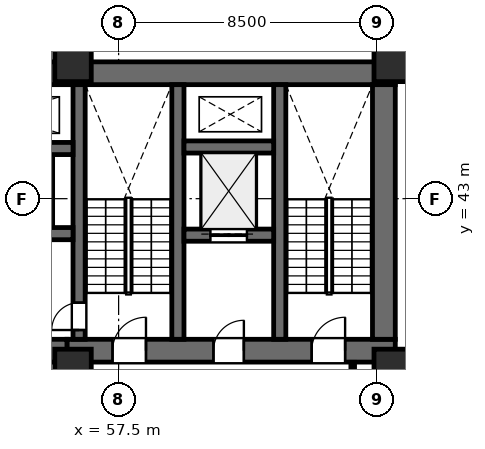
"""IFC4 building model, lengths in metres.
Left out: names, types, materials, properties, quantities, classifications, styles, units other than length and angle.
Written with IfcOpenShell. Run it as: python <this file> out.ifc"""

import sys

from ifc_helpers import new_model, si_unit, direction, frame, frame_2d, origin, origin_2d, place, context, subcontext, project, spatial, rectangle, extrude, element, fill, save


model = new_model("IFC4")
c1 = context("Model", 3, precision=1e-05, world=origin(), true_north=direction((0.0, 1.0)))
c2 = subcontext(c1, "Body", "Model", "MODEL_VIEW")
j1 = project(units=[si_unit("LENGTHUNIT", "METRE"), si_unit("PLANEANGLEUNIT", "RADIAN")], contexts=[c1])
p1 = place(None, origin())
s1 = spatial("IfcSite", under=j1, at=p1, CompositionType="ELEMENT")
p2 = place(p1, origin())
s2 = spatial("IfcBuilding", under=s1, at=p2, CompositionType="ELEMENT")
p3 = place(p2, frame((0.0, 0.0, 37.5)))
s3 = spatial("IfcBuildingStorey", under=s2, at=p3, CompositionType="ELEMENT", Elevation=37.5)
p4 = place(p3, frame((22.9, 47.125, 0.0), z_axis=(0.0, 0.0, 1.0), x_axis=(1.0, 0.0, 0.0)))
e1 = element("IfcWall", 1, at=p4, inside=s3, PredefinedType="SHEAR", context=c2, shape_type="SweptSolid", body=[
    extrude(rectangle(XDim=43.7, YDim=0.75, at=frame_2d((21.85, 0.0))), origin(), (0.0, 0.0, 1.0), 4.0),
])
p5 = place(p3, frame((55.8, 38.0, 0.0), z_axis=(0.0, 0.0, 1.0), x_axis=(1.0, 0.0, 0.0)))
e2 = element("IfcWall", 2, at=p5, inside=s3, PredefinedType="SHEAR", context=c2, shape_type="SweptSolid", body=[
    extrude(rectangle(XDim=10.8, YDim=0.75, at=frame_2d((5.4, 0.0))), origin(), (0.0, 0.0, 1.0), 4.0),
])
p6 = place(p5, frame((1.5, 0.0, 0.0)))
e3 = element("IfcOpeningElement", 3, at=p6, cuts=e2, PredefinedType="OPENING", context=c2, shape_type="SweptSolid", body=[
    extrude(rectangle(XDim=1.1, YDim=2.2, at=frame_2d((0.55, 1.1))), frame((0.0, 0.385, 0.0), z_axis=(0.0, -1.0, 0.0), x_axis=(1.0, 0.0, 0.0)), (0.0, 0.0, 1.0), 0.77),
])
p7 = place(p5, frame((4.82, 0.0, 0.0)))
e4 = element("IfcOpeningElement", 4, at=p7, cuts=e2, PredefinedType="OPENING", context=c2, shape_type="SweptSolid", body=[
    extrude(rectangle(XDim=1.0, YDim=2.15, at=frame_2d((0.5, 1.075))), frame((0.0, 0.385, 0.0), z_axis=(0.0, -1.0, 0.0), x_axis=(1.0, 0.0, 0.0)), (0.0, 0.0, 1.0), 0.77),
])
p8 = place(p5, frame((8.05, 0.0, 0.0)))
e5 = element("IfcOpeningElement", 5, at=p8, cuts=e2, PredefinedType="OPENING", context=c2, shape_type="SweptSolid", body=[
    extrude(rectangle(XDim=1.1, YDim=2.2, at=frame_2d((0.55, 1.1))), frame((0.0, 0.385, 0.0), z_axis=(0.0, -1.0, 0.0), x_axis=(1.0, 0.0, 0.0)), (0.0, 0.0, 1.0), 0.77),
])
p9 = place(p3, frame((66.225, 38.375, 0.0), z_axis=(0.0, 0.0, 1.0), x_axis=(0.0, 1.0, 0.0)))
e6 = element("IfcWall", 6, at=p9, inside=s3, PredefinedType="SHEAR", context=c2, shape_type="SweptSolid", body=[
    extrude(rectangle(XDim=8.375, YDim=0.75, at=frame_2d((4.188, 0.0))), origin(), (0.0, 0.0, 1.0), 4.0),
])
for number, where, z_axis, x_axis in (
    (7, (62.8, 38.375, 0.0), (0.0, 0.0, 1.0), (0.0, 1.0, 0.0)),
    (8, (59.45, 38.375, 0.0), (0.0, 0.0, 1.0), (0.0, 1.0, 0.0)),
):
    element("IfcWall", number, at=place(p3, frame(where, z_axis=z_axis, x_axis=x_axis)), inside=s3, PredefinedType="SHEAR", context=c2, shape_type="SweptSolid", body=[
        extrude(rectangle(XDim=8.375, YDim=0.4, at=frame_2d((4.188, 0.0))), origin(), (0.0, 0.0, 1.0), 4.0),
    ])
p10 = place(p3, frame((56.2, 38.375, 0.0), z_axis=(0.0, 0.0, 1.0), x_axis=(0.0, 1.0, 0.0)))
e9 = element("IfcWall", 9, at=p10, inside=s3, PredefinedType="SHEAR", context=c2, shape_type="SweptSolid", body=[
    extrude(rectangle(XDim=8.375, YDim=0.4, at=frame_2d((4.188, 0.0))), origin(), (0.0, 0.0, 1.0), 4.0),
])
p11 = place(p10, frame((0.305, 0.0, 0.0)))
e10 = element("IfcOpeningElement", 10, at=p11, cuts=e9, PredefinedType="OPENING", context=c2, shape_type="SweptSolid", body=[
    extrude(rectangle(XDim=0.9, YDim=2.15, at=frame_2d((0.45, 1.075))), frame((0.0, 0.21, 0.0), z_axis=(0.0, -1.0, 0.0), x_axis=(1.0, 0.0, 0.0)), (0.0, 0.0, 1.0), 0.42),
])
p12 = place(p3, frame((59.65, 41.8, 0.0), z_axis=(0.0, 0.0, 1.0), x_axis=(1.0, 0.0, 0.0)))
e11 = element("IfcWall", 11, at=p12, inside=s3, PredefinedType="SHEAR", context=c2, shape_type="SweptSolid", body=[
    extrude(rectangle(XDim=2.95, YDim=0.4, at=frame_2d((1.475, 0.0))), origin(), (0.0, 0.0, 1.0), 4.0),
])
p13 = place(p12, frame((0.87, 0.0, 0.0)))
e12 = element("IfcOpeningElement", 12, at=p13, cuts=e11, PredefinedType="OPENING", context=c2, shape_type="SweptSolid", body=[
    extrude(rectangle(XDim=1.2, YDim=2.2, at=frame_2d((0.6, 1.1))), frame((0.0, 0.21, 0.0), z_axis=(0.0, -1.0, 0.0), x_axis=(1.0, 0.0, 0.0)), (0.0, 0.0, 1.0), 0.42),
])
p14 = place(p3, frame((59.65, 44.7, 0.0), z_axis=(0.0, 0.0, 1.0), x_axis=(1.0, 0.0, 0.0)))
e13 = element("IfcWall", 13, at=p14, inside=s3, PredefinedType="SHEAR", context=c2, shape_type="SweptSolid", body=[
    extrude(rectangle(XDim=2.95, YDim=0.4, at=frame_2d((1.475, 0.0))), origin(), (0.0, 0.0, 1.0), 4.0),
])
p15 = place(p3, frame((50.8, 38.0, 0.0), z_axis=(0.0, 0.0, 1.0), x_axis=(1.0, 0.0, 0.0)))
e14 = element("IfcWall", 14, at=p15, inside=s3, PredefinedType="SHEAR", context=c2, shape_type="SweptSolid", body=[
    extrude(rectangle(XDim=5.0, YDim=0.75, at=frame_2d((2.5, 0.0))), origin(), (0.0, 0.0, 1.0), 4.0),
])
p16 = place(p15, frame((2.0, 0.0, 0.0)))
e15 = element("IfcOpeningElement", 15, at=p16, cuts=e14, PredefinedType="OPENING", context=c2, shape_type="SweptSolid", body=[
    extrude(rectangle(XDim=1.2, YDim=2.2, at=frame_2d((0.6, 1.1))), frame((0.0, 0.385, 0.0), z_axis=(0.0, -1.0, 0.0), x_axis=(1.0, 0.0, 0.0)), (0.0, 0.0, 1.0), 0.77),
])
p17 = place(p3, frame((51.25, 41.85, 0.0), z_axis=(0.0, 0.0, 1.0), x_axis=(1.0, 0.0, 0.0)))
e16 = element("IfcWall", 16, at=p17, inside=s3, PredefinedType="SHEAR", context=c2, shape_type="SweptSolid", body=[
    extrude(rectangle(XDim=4.75, YDim=0.4, at=frame_2d((2.375, 0.0))), origin(), (0.0, 0.0, 1.0), 4.0),
])
p18 = place(p17, frame((0.5, 0.0, 0.0)))
e17 = element("IfcOpeningElement", 17, at=p18, cuts=e16, PredefinedType="OPENING", context=c2, shape_type="SweptSolid", body=[
    extrude(rectangle(XDim=1.2, YDim=2.2, at=frame_2d((0.6, 1.1))), frame((0.0, 0.21, 0.0), z_axis=(0.0, -1.0, 0.0), x_axis=(1.0, 0.0, 0.0)), (0.0, 0.0, 1.0), 0.42),
])
p19 = place(p17, frame((2.6, 0.0, 0.0)))
e18 = element("IfcOpeningElement", 18, at=p19, cuts=e16, PredefinedType="OPENING", context=c2, shape_type="SweptSolid", body=[
    extrude(rectangle(XDim=1.2, YDim=2.2, at=frame_2d((0.6, 1.1))), frame((0.0, 0.21, 0.0), z_axis=(0.0, -1.0, 0.0), x_axis=(1.0, 0.0, 0.0)), (0.0, 0.0, 1.0), 0.42),
])
p20 = place(p3, frame((51.25, 44.65, 0.0), z_axis=(0.0, 0.0, 1.0), x_axis=(1.0, 0.0, 0.0)))
e19 = element("IfcWall", 19, at=p20, inside=s3, PredefinedType="SHEAR", context=c2, shape_type="SweptSolid", body=[
    extrude(rectangle(XDim=4.75, YDim=0.4, at=frame_2d((2.375, 0.0))), origin(), (0.0, 0.0, 1.0), 4.0),
])
for number, where, z_axis, x_axis in (
    (20, (66.5, 47.55, 0.0), (0.0, 0.0, 1.0), (1.0, 0.0, 0.0)),
    (21, (56.0, 47.55, 0.0), (0.0, 0.0, 1.0), (1.0, 0.0, 0.0)),
    (22, (66.5, 37.35, 0.0), (0.0, 0.0, 1.0), (1.0, 0.0, 0.0)),
    (23, (56.0, 37.35, 0.0), (0.0, 0.0, 1.0), (1.0, 0.0, 0.0)),
):
    element("IfcColumn", number, at=place(p3, frame(where, z_axis=z_axis, x_axis=x_axis)), inside=s3, PredefinedType="COLUMN", context=c2, shape_type="SweptSolid", body=[
        extrude(rectangle(XDim=1.2, YDim=1.4, at=origin_2d()), origin(), (0.0, 0.0, 1.0), 4.0),
    ])
p21 = place(p3, frame((68.375, 37.8, 0.0), z_axis=(0.0, 0.0, 1.0), x_axis=(-0.139174610616, -0.990267856572, 0.0)))
e24 = element("IfcWall", 24, at=p21, inside=s3, PredefinedType="STANDARD", context=c2, shape_type="SweptSolid", body=[
    extrude(rectangle(XDim=34.6, YDim=0.28, at=frame_2d((17.3, 0.0))), origin(), (0.0, 0.0, 1.0), 3.74),
])
p22 = place(p21, frame((8.44, 0.0, 0.0)))
e25 = element("IfcOpeningElement", 25, at=p22, cuts=e24, PredefinedType="OPENING", context=c2, shape_type="SweptSolid", body=[
    extrude(rectangle(XDim=1.0, YDim=2.15, at=frame_2d((0.5, 1.075))), frame((0.0, 0.15, 0.0), z_axis=(0.0, -1.0, 0.0), x_axis=(1.0, 0.0, 0.0)), (0.0, 0.0, 1.0), 0.3),
])
p23 = place(p21, frame((4.092, 0.0, 0.65)))
e26 = element("IfcOpeningElement", 26, at=p23, cuts=e24, PredefinedType="OPENING", context=c2, shape_type="SweptSolid", body=[
    extrude(rectangle(XDim=1.8, YDim=2.1, at=frame_2d((0.9, 1.05))), frame((0.0, 0.15, 0.0), z_axis=(0.0, -1.0, 0.0), x_axis=(1.0, 0.0, 0.0)), (0.0, 0.0, 1.0), 0.3),
])
p24 = place(p21, frame((20.903, 0.0, 0.65)))
e27 = element("IfcOpeningElement", 27, at=p24, cuts=e24, PredefinedType="OPENING", context=c2, shape_type="SweptSolid", body=[
    extrude(rectangle(XDim=1.8, YDim=2.1, at=frame_2d((0.9, 1.05))), frame((0.0, 0.15, 0.0), z_axis=(0.0, -1.0, 0.0), x_axis=(1.0, 0.0, 0.0)), (0.0, 0.0, 1.0), 0.3),
])
p25 = place(p3, frame((65.2, 34.4, 0.0), z_axis=(0.0, 0.0, 1.0), x_axis=(0.0, 1.0, 0.0)))
e28 = element("IfcWall", 28, at=p25, inside=s3, PredefinedType="PARTITIONING", context=c2, shape_type="SweptSolid", body=[
    extrude(rectangle(XDim=3.217, YDim=0.12, at=frame_2d((1.608, 0.0))), origin(), (0.0, 0.0, 1.0), 2.813),
])
p26 = place(p6, origin())
e29 = element("IfcDoor", 29, at=p26, inside=s3, OperationType="SINGLE_SWING_RIGHT", PredefinedType="DOOR", context=c2, shape_type="SweptSolid", body=[
    extrude(rectangle(XDim=1.1, YDim=2.2, at=frame_2d((0.55, 1.1))), frame((0.0, 0.025, 0.0), z_axis=(0.0, -1.0, 0.0), x_axis=(1.0, 0.0, 0.0)), (0.0, 0.0, 1.0), 0.05),
])
fill(e3, e29)
p27 = place(p7, origin())
e30 = element("IfcDoor", 30, at=p27, inside=s3, OperationType="SINGLE_SWING_RIGHT", PredefinedType="DOOR", context=c2, shape_type="SweptSolid", body=[
    extrude(rectangle(XDim=1.0, YDim=2.15, at=frame_2d((0.5, 1.075))), frame((0.0, 0.025, 0.0), z_axis=(0.0, -1.0, 0.0), x_axis=(1.0, 0.0, 0.0)), (0.0, 0.0, 1.0), 0.05),
])
fill(e4, e30)
p28 = place(p8, origin())
e31 = element("IfcDoor", 31, at=p28, inside=s3, OperationType="SINGLE_SWING_RIGHT", PredefinedType="DOOR", context=c2, shape_type="SweptSolid", body=[
    extrude(rectangle(XDim=1.1, YDim=2.2, at=frame_2d((0.55, 1.1))), frame((0.0, 0.025, 0.0), z_axis=(0.0, -1.0, 0.0), x_axis=(1.0, 0.0, 0.0)), (0.0, 0.0, 1.0), 0.05),
])
fill(e5, e31)
p29 = place(p11, origin())
e32 = element("IfcDoor", 32, at=p29, inside=s3, OperationType="SINGLE_SWING_LEFT", PredefinedType="DOOR", context=c2, shape_type="SweptSolid", body=[
    extrude(rectangle(XDim=0.9, YDim=2.15, at=frame_2d((0.45, 1.075))), frame((0.0, 0.025, 0.0), z_axis=(0.0, -1.0, 0.0), x_axis=(1.0, 0.0, 0.0)), (0.0, 0.0, 1.0), 0.05),
])
fill(e10, e32)
p30 = place(p13, origin())
e33 = element("IfcDoor", 33, at=p30, inside=s3, OperationType="DOUBLE_DOOR_SLIDING", PredefinedType="DOOR", context=c2, shape_type="SweptSolid", body=[
    extrude(rectangle(XDim=1.2, YDim=2.2, at=frame_2d((0.6, 1.1))), frame((0.0, 0.025, 0.0), z_axis=(0.0, -1.0, 0.0), x_axis=(1.0, 0.0, 0.0)), (0.0, 0.0, 1.0), 0.05),
])
fill(e12, e33)
save(model, sys.argv[1])
